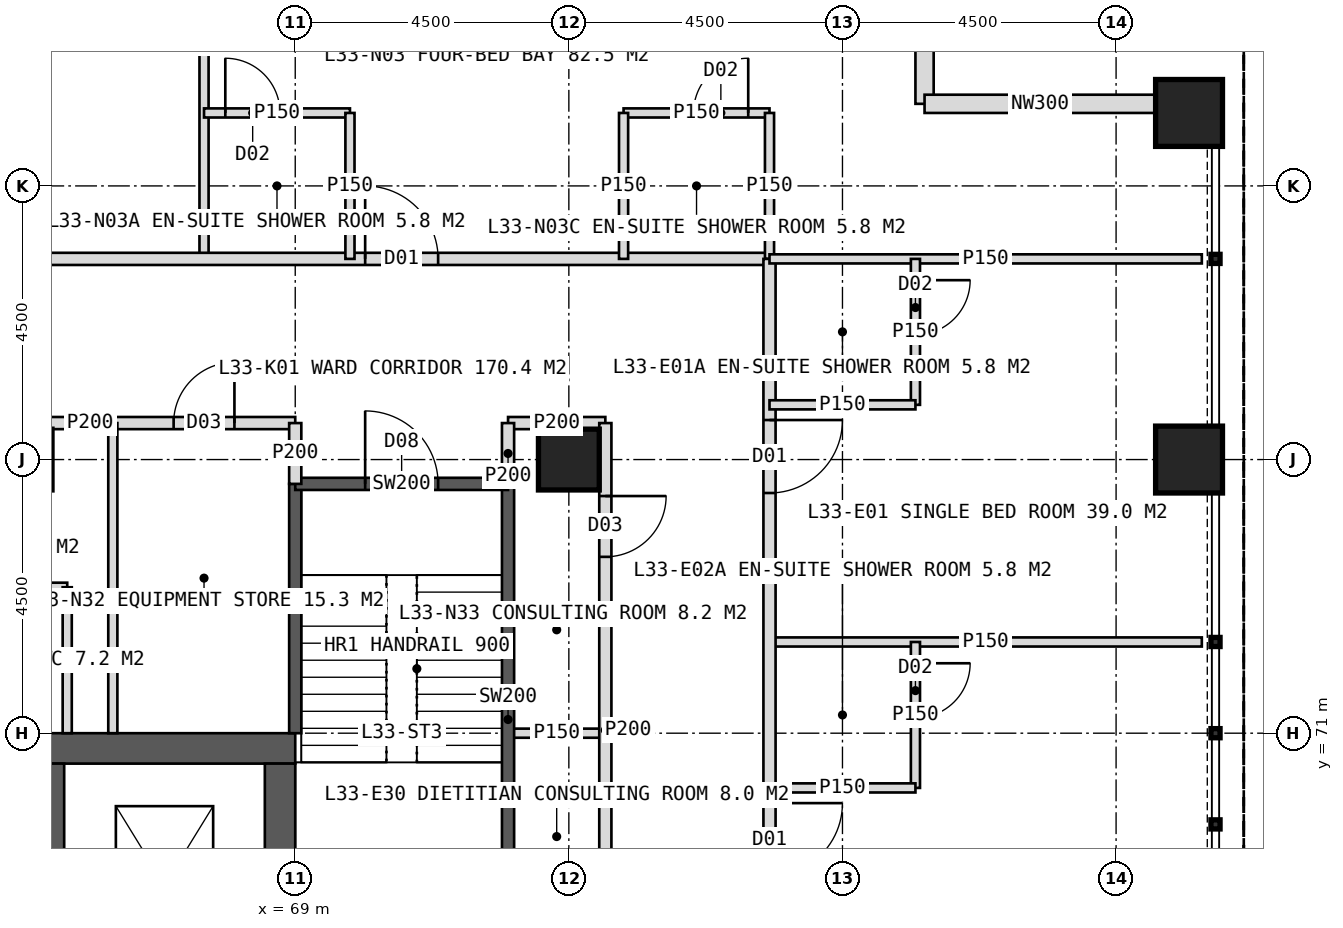
"""IFC4 building model, lengths in metres.
Left out: names, types, materials, properties, quantities, classifications, styles, units other than length and angle.
Written with IfcOpenShell. Run it as: python <this file> out.ifc"""

import sys

from ifc_helpers import new_model, si_unit, direction, frame, frame_2d, origin, origin_2d, place, context, subcontext, project, spatial, rectangle, hollow_rectangle, extrude, element, fill, save


model = new_model("IFC4")
c1 = context("Model", 3, precision=1e-05, world=origin(), true_north=direction((0.0, 1.0)))
c2 = subcontext(c1, "Body", "Model", "MODEL_VIEW")
j1 = project(units=[si_unit("LENGTHUNIT", "METRE"), si_unit("PLANEANGLEUNIT", "RADIAN")], contexts=[c1])
p1 = place(None, origin())
s1 = spatial("IfcSite", under=j1, at=p1, CompositionType="ELEMENT")
p2 = place(p1, origin())
s2 = spatial("IfcBuilding", under=s1, at=p2, CompositionType="ELEMENT")
p3 = place(p2, frame((0.0, 0.0, 140.0)))
s3 = spatial("IfcBuildingStorey", under=s2, at=p3, CompositionType="ELEMENT", Elevation=140.0)
p4 = place(p3, frame((51.0, 70.75, 0.0), z_axis=(0.0, 0.0, 1.0), x_axis=(1.0, 0.0, 0.0)))
e1 = element("IfcWall", 1, at=p4, inside=s3, PredefinedType="SHEAR", context=c2, shape_type="SweptSolid", body=[
    extrude(rectangle(XDim=18.0, YDim=0.5, at=frame_2d((9.0, 0.0))), origin(), (0.0, 0.0, 1.0), 4.0),
])
p5 = place(p4, frame((8.1, 0.0, 0.0)))
e2 = element("IfcOpeningElement", 2, at=p5, cuts=e1, PredefinedType="OPENING", context=c2, shape_type="SweptSolid", body=[
    extrude(rectangle(XDim=1.8, YDim=2.2, at=frame_2d((0.9, 1.1))), frame((0.0, 0.26, 0.0), z_axis=(0.0, -1.0, 0.0), x_axis=(1.0, 0.0, 0.0)), (0.0, 0.0, 1.0), 0.52),
])
p6 = place(p3, frame((68.75, 53.5, 0.0), z_axis=(0.0, 0.0, 1.0), x_axis=(0.0, 1.0, 0.0)))
e3 = element("IfcWall", 3, at=p6, inside=s3, PredefinedType="SHEAR", context=c2, shape_type="SweptSolid", body=[
    extrude(rectangle(XDim=17.0, YDim=0.5, at=frame_2d((8.5, 0.0))), origin(), (0.0, 0.0, 1.0), 4.0),
])
p7 = place(p6, frame((9.5, 0.0, 0.0)))
e4 = element("IfcOpeningElement", 4, at=p7, cuts=e3, PredefinedType="OPENING", context=c2, shape_type="SweptSolid", body=[
    extrude(rectangle(XDim=1.5, YDim=2.2, at=frame_2d((0.75, 1.1))), frame((0.0, 0.26, 0.0), z_axis=(0.0, -1.0, 0.0), x_axis=(1.0, 0.0, 0.0)), (0.0, 0.0, 1.0), 0.52),
])
p8 = place(p3, frame((65.05, 53.5, 0.0), z_axis=(0.0, 0.0, 1.0), x_axis=(0.0, 1.0, 0.0)))
e5 = element("IfcWall", 5, at=p8, inside=s3, PredefinedType="SHEAR", context=c2, shape_type="SweptSolid", body=[
    extrude(rectangle(XDim=17.0, YDim=0.3, at=frame_2d((8.5, 0.0))), origin(), (0.0, 0.0, 1.0), 4.0),
])
p9 = place(p3, frame((73.5, 75.5, 0.0), z_axis=(0.0, 0.0, 1.0), x_axis=(1.0, 0.0, 0.0)))
e6 = element("IfcColumn", 6, at=p9, inside=s3, PredefinedType="COLUMN", context=c2, shape_type="SweptSolid", body=[
    extrude(hollow_rectangle(XDim=1.0, YDim=1.0, WallThickness=0.1, at=origin_2d()), origin(), (0.0, 0.0, 1.0), 4.0),
])
for number, where, z_axis, x_axis in (
    (7, (83.7, 75.5, 0.0), (0.0, 0.0, 1.0), (1.0, 0.0, 0.0)),
    (8, (83.7, 81.2, 0.0), (0.0, 0.0, 1.0), (1.0, 0.0, 0.0)),
):
    element("IfcColumn", number, at=place(p3, frame(where, z_axis=z_axis, x_axis=x_axis)), inside=s3, PredefinedType="COLUMN", context=c2, shape_type="SweptSolid", body=[
        extrude(hollow_rectangle(XDim=1.1, YDim=1.1, WallThickness=0.1, at=origin_2d()), origin(), (0.0, 0.0, 1.0), 4.0),
    ])
for number, where, z_axis, x_axis in (
    (9, (79.35, 85.15, 0.0), (0.0, 0.0, 1.0), (0.0, -1.0, 0.0)),
    (10, (79.35, 81.35, 0.0), (0.0, 0.0, 1.0), (1.0, 0.0, 0.0)),
):
    element("IfcWall", number, at=place(p3, frame(where, z_axis=z_axis, x_axis=x_axis)), inside=s3, PredefinedType="ELEMENTEDWALL", context=c2, shape_type="SweptSolid", body=[
        extrude(rectangle(XDim=3.8, YDim=0.3, at=frame_2d((1.9, 0.0))), origin(), (0.0, 0.0, 1.0), 4.0),
    ])
p10 = place(p3, frame((67.5, 78.8, 0.0), z_axis=(0.0, 0.0, 1.0), x_axis=(0.0, 1.0, 0.0)))
e11 = element("IfcWall", 11, at=p10, inside=s3, PredefinedType="PARTITIONING", context=c2, shape_type="SweptSolid", body=[
    extrude(rectangle(XDim=7.11, YDim=0.15, at=frame_2d((3.555, 0.0))), origin(), (0.0, 0.0, 1.0), 3.75),
])
p11 = place(p3, frame((43.2, 78.8, 0.0), z_axis=(0.0, 0.0, 1.0), x_axis=(1.0, 0.0, 0.0)))
e12 = element("IfcWall", 12, at=p11, inside=s3, PredefinedType="PARTITIONING", context=c2, shape_type="SweptSolid", body=[
    extrude(rectangle(XDim=33.6, YDim=0.2, at=frame_2d((16.8, 0.0))), origin(), (0.0, 0.0, 1.0), 3.75),
])
p12 = place(p11, frame((3.25, 0.0, 0.0)))
e13 = element("IfcOpeningElement", 13, at=p12, cuts=e12, PredefinedType="OPENING", context=c2, shape_type="SweptSolid", body=[
    extrude(rectangle(XDim=1.2, YDim=2.2, at=frame_2d((0.6, 1.1))), frame((0.0, 0.11, 0.0), z_axis=(0.0, -1.0, 0.0), x_axis=(1.0, 0.0, 0.0)), (0.0, 0.0, 1.0), 0.22),
])
p13 = place(p11, frame((12.55, 0.0, 0.0)))
e14 = element("IfcOpeningElement", 14, at=p13, cuts=e12, PredefinedType="OPENING", context=c2, shape_type="SweptSolid", body=[
    extrude(rectangle(XDim=1.2, YDim=2.2, at=frame_2d((0.6, 1.1))), frame((0.0, 0.11, 0.0), z_axis=(0.0, -1.0, 0.0), x_axis=(1.0, 0.0, 0.0)), (0.0, 0.0, 1.0), 0.22),
])
p14 = place(p11, frame((26.95, 0.0, 0.0)))
e15 = element("IfcOpeningElement", 15, at=p14, cuts=e12, PredefinedType="OPENING", context=c2, shape_type="SweptSolid", body=[
    extrude(rectangle(XDim=1.2, YDim=2.2, at=frame_2d((0.6, 1.1))), frame((0.0, 0.11, 0.0), z_axis=(0.0, -1.0, 0.0), x_axis=(1.0, 0.0, 0.0)), (0.0, 0.0, 1.0), 0.22),
])
p15 = place(p3, frame((67.5, 81.2, 0.0), z_axis=(0.0, 0.0, 1.0), x_axis=(1.0, 0.0, 0.0)))
e16 = element("IfcWall", 16, at=p15, inside=s3, PredefinedType="PARTITIONING", context=c2, shape_type="SweptSolid", body=[
    extrude(rectangle(XDim=2.4, YDim=0.15, at=frame_2d((1.2, 0.0))), origin(), (0.0, 0.0, 1.0), 3.75),
])
p16 = place(p15, frame((0.35, 0.0, 0.0)))
e17 = element("IfcOpeningElement", 17, at=p16, cuts=e16, PredefinedType="OPENING", context=c2, shape_type="SweptSolid", body=[
    extrude(rectangle(XDim=0.9, YDim=2.1, at=frame_2d((0.45, 1.05))), frame((0.0, 0.085, 0.0), z_axis=(0.0, -1.0, 0.0), x_axis=(1.0, 0.0, 0.0)), (0.0, 0.0, 1.0), 0.17),
])
p17 = place(p3, frame((69.9, 78.8, 0.0), z_axis=(0.0, 0.0, 1.0), x_axis=(0.0, 1.0, 0.0)))
e18 = element("IfcWall", 18, at=p17, inside=s3, PredefinedType="PARTITIONING", context=c2, shape_type="SweptSolid", body=[
    extrude(rectangle(XDim=2.4, YDim=0.15, at=frame_2d((1.2, 0.0))), origin(), (0.0, 0.0, 1.0), 3.75),
])
p18 = place(p3, frame((74.4, 81.2, 0.0), z_axis=(0.0, 0.0, 1.0), x_axis=(1.0, 0.0, 0.0)))
e19 = element("IfcWall", 19, at=p18, inside=s3, PredefinedType="PARTITIONING", context=c2, shape_type="SweptSolid", body=[
    extrude(rectangle(XDim=2.4, YDim=0.15, at=frame_2d((1.2, 0.0))), origin(), (0.0, 0.0, 1.0), 2.997),
])
p19 = place(p18, frame((1.15, 0.0, 0.0)))
e20 = element("IfcOpeningElement", 20, at=p19, cuts=e19, PredefinedType="OPENING", context=c2, shape_type="SweptSolid", body=[
    extrude(rectangle(XDim=0.9, YDim=2.1, at=frame_2d((0.45, 1.05))), frame((0.0, 0.085, 0.0), z_axis=(0.0, -1.0, 0.0), x_axis=(1.0, 0.0, 0.0)), (0.0, 0.0, 1.0), 0.17),
])
for number, where, z_axis, x_axis in (
    (21, (74.4, 78.8, 0.0), (0.0, 0.0, 1.0), (0.0, 1.0, 0.0)),
    (22, (76.8, 78.8, 0.0), (0.0, 0.0, 1.0), (0.0, 1.0, 0.0)),
):
    element("IfcWall", number, at=place(p3, frame(where, z_axis=z_axis, x_axis=x_axis)), inside=s3, PredefinedType="PARTITIONING", context=c2, shape_type="SweptSolid", body=[
        extrude(rectangle(XDim=2.4, YDim=0.15, at=frame_2d((1.2, 0.0))), origin(), (0.0, 0.0, 1.0), 3.75),
    ])
p20 = place(p3, frame((62.25, 76.1, 0.0), z_axis=(0.0, 0.0, 1.0), x_axis=(1.0, 0.0, 0.0)))
e23 = element("IfcWall", 23, at=p20, inside=s3, PredefinedType="PARTITIONING", context=c2, shape_type="SweptSolid", body=[
    extrude(rectangle(XDim=6.75, YDim=0.2, at=frame_2d((3.375, 0.0))), origin(), (0.0, 0.0, 1.0), 3.75),
])
p21 = place(p20, frame((0.325, 0.0, 0.0)))
e24 = element("IfcOpeningElement", 24, at=p21, cuts=e23, PredefinedType="OPENING", context=c2, shape_type="SweptSolid", body=[
    extrude(rectangle(XDim=1.0, YDim=2.1, at=frame_2d((0.5, 1.05))), frame((0.0, 0.11, 0.0), z_axis=(0.0, -1.0, 0.0), x_axis=(1.0, 0.0, 0.0)), (0.0, 0.0, 1.0), 0.22),
])
p22 = place(p20, frame((4.75, 0.0, 0.0)))
e25 = element("IfcOpeningElement", 25, at=p22, cuts=e23, PredefinedType="OPENING", context=c2, shape_type="SweptSolid", body=[
    extrude(rectangle(XDim=1.0, YDim=2.1, at=frame_2d((0.5, 1.05))), frame((0.0, 0.11, 0.0), z_axis=(0.0, -1.0, 0.0), x_axis=(1.0, 0.0, 0.0)), (0.0, 0.0, 1.0), 0.22),
])
p23 = place(p3, frame((72.5, 76.1, 0.0), z_axis=(0.0, 0.0, 1.0), x_axis=(1.0, 0.0, 0.0)))
e26 = element("IfcWall", 26, at=p23, inside=s3, PredefinedType="PARTITIONING", context=c2, shape_type="SweptSolid", body=[
    extrude(rectangle(XDim=1.6, YDim=0.2, at=frame_2d((0.8, 0.0))), origin(), (0.0, 0.0, 1.0), 3.75),
])
p24 = place(p3, frame((66.0, 71.0, 0.0), z_axis=(0.0, 0.0, 1.0), x_axis=(0.0, 1.0, 0.0)))
e27 = element("IfcWall", 27, at=p24, inside=s3, PredefinedType="PARTITIONING", context=c2, shape_type="SweptSolid", body=[
    extrude(rectangle(XDim=5.1, YDim=0.15, at=frame_2d((2.55, 0.0))), origin(), (0.0, 0.0, 1.0), 3.75),
])
p25 = place(p3, frame((62.25, 73.4, 0.0), z_axis=(0.0, 0.0, 1.0), x_axis=(1.0, 0.0, 0.0)))
e28 = element("IfcWall", 28, at=p25, inside=s3, PredefinedType="PARTITIONING", context=c2, shape_type="SweptSolid", body=[
    extrude(rectangle(XDim=3.0, YDim=0.15, at=frame_2d((1.5, 0.0))), origin(), (0.0, 0.0, 1.0), 3.75),
])
p26 = place(p3, frame((65.25, 71.0, 0.0), z_axis=(0.0, 0.0, 1.0), x_axis=(0.0, 1.0, 0.0)))
e29 = element("IfcWall", 29, at=p26, inside=s3, PredefinedType="PARTITIONING", context=c2, shape_type="SweptSolid", body=[
    extrude(rectangle(XDim=2.4, YDim=0.15, at=frame_2d((1.2, 0.0))), origin(), (0.0, 0.0, 1.0), 3.75),
])
p27 = place(p3, frame((76.8, 72.5, 0.0), z_axis=(0.0, 0.0, 1.0), x_axis=(1.0, 0.0, 0.0)))
e30 = element("IfcWall", 30, at=p27, inside=s3, PredefinedType="PARTITIONING", context=c2, shape_type="SweptSolid", body=[
    extrude(rectangle(XDim=7.11, YDim=0.15, at=frame_2d((3.555, 0.0))), origin(), (0.0, 0.0, 1.0), 3.75),
])
p28 = place(p3, frame((76.8, 78.8, 0.0), z_axis=(0.0, 0.0, 1.0), x_axis=(0.0, -1.0, 0.0)))
e31 = element("IfcWall", 31, at=p28, inside=s3, PredefinedType="PARTITIONING", context=c2, shape_type="SweptSolid", body=[
    extrude(rectangle(XDim=33.6, YDim=0.2, at=frame_2d((16.8, 0.0))), origin(), (0.0, 0.0, 1.0), 3.75),
])
p29 = place(p28, frame((2.65, 0.0, 0.0)))
e32 = element("IfcOpeningElement", 32, at=p29, cuts=e31, PredefinedType="OPENING", context=c2, shape_type="SweptSolid", body=[
    extrude(rectangle(XDim=1.2, YDim=2.2, at=frame_2d((0.6, 1.1))), frame((0.0, 0.11, 0.0), z_axis=(0.0, -1.0, 0.0), x_axis=(1.0, 0.0, 0.0)), (0.0, 0.0, 1.0), 0.22),
])
p30 = place(p28, frame((8.95, 0.0, 0.0)))
e33 = element("IfcOpeningElement", 33, at=p30, cuts=e31, PredefinedType="OPENING", context=c2, shape_type="SweptSolid", body=[
    extrude(rectangle(XDim=1.2, YDim=2.2, at=frame_2d((0.6, 1.1))), frame((0.0, 0.11, 0.0), z_axis=(0.0, -1.0, 0.0), x_axis=(1.0, 0.0, 0.0)), (0.0, 0.0, 1.0), 0.22),
])
p31 = place(p28, frame((19.45, 0.0, 0.0)))
e34 = element("IfcOpeningElement", 34, at=p31, cuts=e31, PredefinedType="OPENING", context=c2, shape_type="SweptSolid", body=[
    extrude(rectangle(XDim=1.2, YDim=2.2, at=frame_2d((0.6, 1.1))), frame((0.0, 0.11, 0.0), z_axis=(0.0, -1.0, 0.0), x_axis=(1.0, 0.0, 0.0)), (0.0, 0.0, 1.0), 0.22),
])
p32 = place(p28, frame((28.45, 0.0, 0.0)))
e35 = element("IfcOpeningElement", 35, at=p32, cuts=e31, PredefinedType="OPENING", context=c2, shape_type="SweptSolid", body=[
    extrude(rectangle(XDim=1.2, YDim=2.2, at=frame_2d((0.6, 1.1))), frame((0.0, 0.11, 0.0), z_axis=(0.0, -1.0, 0.0), x_axis=(1.0, 0.0, 0.0)), (0.0, 0.0, 1.0), 0.22),
])
p33 = place(p3, frame((76.8, 78.8, 0.0), z_axis=(0.0, 0.0, 1.0), x_axis=(1.0, 0.0, 0.0)))
e36 = element("IfcWall", 36, at=p33, inside=s3, PredefinedType="PARTITIONING", context=c2, shape_type="SweptSolid", body=[
    extrude(rectangle(XDim=7.11, YDim=0.15, at=frame_2d((3.555, 0.0))), origin(), (0.0, 0.0, 1.0), 3.75),
])
p34 = place(p3, frame((79.2, 78.8, 0.0), z_axis=(0.0, 0.0, 1.0), x_axis=(0.0, -1.0, 0.0)))
e37 = element("IfcWall", 37, at=p34, inside=s3, PredefinedType="PARTITIONING", context=c2, shape_type="SweptSolid", body=[
    extrude(rectangle(XDim=2.4, YDim=0.15, at=frame_2d((1.2, 0.0))), origin(), (0.0, 0.0, 1.0), 2.997),
])
p35 = place(p34, frame((0.35, 0.0, 0.0)))
e38 = element("IfcOpeningElement", 38, at=p35, cuts=e37, PredefinedType="OPENING", context=c2, shape_type="SweptSolid", body=[
    extrude(rectangle(XDim=0.9, YDim=2.1, at=frame_2d((0.45, 1.05))), frame((0.0, 0.085, 0.0), z_axis=(0.0, -1.0, 0.0), x_axis=(1.0, 0.0, 0.0)), (0.0, 0.0, 1.0), 0.17),
])
p36 = place(p3, frame((76.8, 76.4, 0.0), z_axis=(0.0, 0.0, 1.0), x_axis=(1.0, 0.0, 0.0)))
e39 = element("IfcWall", 39, at=p36, inside=s3, PredefinedType="PARTITIONING", context=c2, shape_type="SweptSolid", body=[
    extrude(rectangle(XDim=2.4, YDim=0.15, at=frame_2d((1.2, 0.0))), origin(), (0.0, 0.0, 1.0), 3.75),
])
p37 = place(p3, frame((79.2, 72.5, 0.0), z_axis=(0.0, 0.0, 1.0), x_axis=(0.0, -1.0, 0.0)))
e40 = element("IfcWall", 40, at=p37, inside=s3, PredefinedType="PARTITIONING", context=c2, shape_type="SweptSolid", body=[
    extrude(rectangle(XDim=2.4, YDim=0.15, at=frame_2d((1.2, 0.0))), origin(), (0.0, 0.0, 1.0), 3.75),
])
p38 = place(p37, frame((0.35, 0.0, 0.0)))
e41 = element("IfcOpeningElement", 41, at=p38, cuts=e40, PredefinedType="OPENING", context=c2, shape_type="SweptSolid", body=[
    extrude(rectangle(XDim=0.9, YDim=2.1, at=frame_2d((0.45, 1.05))), frame((0.0, 0.085, 0.0), z_axis=(0.0, -1.0, 0.0), x_axis=(1.0, 0.0, 0.0)), (0.0, 0.0, 1.0), 0.17),
])
p39 = place(p3, frame((76.8, 70.1, 0.0), z_axis=(0.0, 0.0, 1.0), x_axis=(1.0, 0.0, 0.0)))
e42 = element("IfcWall", 42, at=p39, inside=s3, PredefinedType="PARTITIONING", context=c2, shape_type="SweptSolid", body=[
    extrude(rectangle(XDim=2.4, YDim=0.15, at=frame_2d((1.2, 0.0))), origin(), (0.0, 0.0, 1.0), 3.75),
])
p40 = place(p3, frame((72.5, 71.0, 0.0), z_axis=(0.0, 0.0, 1.0), x_axis=(1.0, 0.0, 0.0)))
e43 = element("IfcWall", 43, at=p40, inside=s3, PredefinedType="PARTITIONING", context=c2, shape_type="SweptSolid", body=[
    extrude(rectangle(XDim=1.6, YDim=0.15, at=frame_2d((0.8, 0.0))), origin(), (0.0, 0.0, 1.0), 3.75),
])
p41 = place(p3, frame((74.1, 76.1, 0.0), z_axis=(0.0, 0.0, 1.0), x_axis=(0.0, -1.0, 0.0)))
e44 = element("IfcWall", 44, at=p41, inside=s3, PredefinedType="PARTITIONING", context=c2, shape_type="SweptSolid", body=[
    extrude(rectangle(XDim=10.1, YDim=0.2, at=frame_2d((5.05, 0.0))), origin(), (0.0, 0.0, 1.0), 3.75),
])
p42 = place(p41, frame((1.2, 0.0, 0.0)))
e45 = element("IfcOpeningElement", 45, at=p42, cuts=e44, PredefinedType="OPENING", context=c2, shape_type="SweptSolid", body=[
    extrude(rectangle(XDim=1.0, YDim=2.1, at=frame_2d((0.5, 1.05))), frame((0.0, 0.11, 0.0), z_axis=(0.0, -1.0, 0.0), x_axis=(1.0, 0.0, 0.0)), (0.0, 0.0, 1.0), 0.22),
])
p43 = place(p41, frame((7.1, 0.0, 0.0)))
e46 = element("IfcOpeningElement", 46, at=p43, cuts=e44, PredefinedType="OPENING", context=c2, shape_type="SweptSolid", body=[
    extrude(rectangle(XDim=1.0, YDim=2.1, at=frame_2d((0.5, 1.05))), frame((0.0, 0.11, 0.0), z_axis=(0.0, -1.0, 0.0), x_axis=(1.0, 0.0, 0.0)), (0.0, 0.0, 1.0), 0.22),
])
p44 = place(p3, frame((69.0, 71.0, 0.0), z_axis=(0.0, 0.0, 1.0), x_axis=(0.0, 1.0, 0.0)))
e47 = element("IfcWall", 47, at=p44, inside=s3, PredefinedType="SOLIDWALL", context=c2, shape_type="SweptSolid", body=[
    extrude(rectangle(XDim=4.1, YDim=0.2, at=frame_2d((2.05, 0.0))), origin(), (0.0, 0.0, 1.0), 3.75),
])
p45 = place(p3, frame((72.5, 67.35, 0.0), z_axis=(0.0, 0.0, 1.0), x_axis=(0.0, 1.0, 0.0)))
e48 = element("IfcWall", 48, at=p45, inside=s3, PredefinedType="SOLIDWALL", context=c2, shape_type="SweptSolid", body=[
    extrude(rectangle(XDim=7.75, YDim=0.2, at=frame_2d((3.875, 0.0))), origin(), (0.0, 0.0, 1.0), 3.75),
])
p46 = place(p3, frame((69.0, 75.1, 0.0), z_axis=(0.0, 0.0, 1.0), x_axis=(1.0, 0.0, 0.0)))
e49 = element("IfcWall", 49, at=p46, inside=s3, PredefinedType="SOLIDWALL", context=c2, shape_type="SweptSolid", body=[
    extrude(rectangle(XDim=3.5, YDim=0.2, at=frame_2d((1.75, 0.0))), origin(), (0.0, 0.0, 1.0), 3.75),
])
p47 = place(p46, frame((1.15, 0.0, 0.0)))
e50 = element("IfcOpeningElement", 50, at=p47, cuts=e49, PredefinedType="OPENING", context=c2, shape_type="SweptSolid", body=[
    extrude(rectangle(XDim=1.2, YDim=2.1, at=frame_2d((0.6, 1.05))), frame((0.0, 0.11, 0.0), z_axis=(0.0, -1.0, 0.0), x_axis=(1.0, 0.0, 0.0)), (0.0, 0.0, 1.0), 0.22),
])
for number, where, z_axis, x_axis in (
    (51, (69.0, 75.1, 0.0), (0.0, 0.0, 1.0), (0.0, 1.0, 0.0)),
    (52, (72.5, 75.1, 0.0), (0.0, 0.0, 1.0), (0.0, 1.0, 0.0)),
):
    element("IfcWall", number, at=place(p3, frame(where, z_axis=z_axis, x_axis=x_axis)), inside=s3, PredefinedType="PARTITIONING", context=c2, shape_type="SweptSolid", body=[
        extrude(rectangle(XDim=1.0, YDim=0.2, at=frame_2d((0.5, 0.0))), origin(), (0.0, 0.0, 1.0), 3.75),
    ])
p48 = place(p14, origin())
e53 = element("IfcDoor", 53, at=p48, inside=s3, OperationType="SINGLE_SWING_LEFT", PredefinedType="DOOR", context=c2, shape_type="SweptSolid", body=[
    extrude(rectangle(XDim=1.2, YDim=2.2, at=frame_2d((0.6, 1.1))), frame((0.0, 0.025, 0.0), z_axis=(0.0, -1.0, 0.0), x_axis=(1.0, 0.0, 0.0)), (0.0, 0.0, 1.0), 0.05),
])
fill(e15, e53)
p49 = place(p16, origin())
e54 = element("IfcDoor", 54, at=p49, inside=s3, OperationType="SINGLE_SWING_LEFT", PredefinedType="DOOR", context=c2, shape_type="SweptSolid", body=[
    extrude(rectangle(XDim=0.9, YDim=2.1, at=frame_2d((0.45, 1.05))), frame((0.0, 0.025, 0.0), z_axis=(0.0, -1.0, 0.0), x_axis=(1.0, 0.0, 0.0)), (0.0, 0.0, 1.0), 0.05),
])
fill(e17, e54)
p50 = place(p19, origin())
e55 = element("IfcDoor", 55, at=p50, inside=s3, OperationType="SINGLE_SWING_RIGHT", PredefinedType="DOOR", context=c2, shape_type="SweptSolid", body=[
    extrude(rectangle(XDim=0.9, YDim=2.1, at=frame_2d((0.45, 1.05))), frame((0.0, 0.025, 0.0), z_axis=(0.0, -1.0, 0.0), x_axis=(1.0, 0.0, 0.0)), (0.0, 0.0, 1.0), 0.05),
])
fill(e20, e55)
p51 = place(p22, origin())
e56 = element("IfcDoor", 56, at=p51, inside=s3, OperationType="SINGLE_SWING_RIGHT", PredefinedType="DOOR", context=c2, shape_type="SweptSolid", body=[
    extrude(rectangle(XDim=1.0, YDim=2.1, at=frame_2d((0.5, 1.05))), frame((0.0, 0.025, 0.0), z_axis=(0.0, -1.0, 0.0), x_axis=(1.0, 0.0, 0.0)), (0.0, 0.0, 1.0), 0.05),
])
fill(e25, e56)
p52 = place(p42, origin())
e57 = element("IfcDoor", 57, at=p52, inside=s3, OperationType="SINGLE_SWING_LEFT", PredefinedType="DOOR", context=c2, shape_type="SweptSolid", body=[
    extrude(rectangle(XDim=1.0, YDim=2.1, at=frame_2d((0.5, 1.05))), frame((0.0, 0.025, 0.0), z_axis=(0.0, -1.0, 0.0), x_axis=(1.0, 0.0, 0.0)), (0.0, 0.0, 1.0), 0.05),
])
fill(e45, e57)
p53 = place(p29, origin())
e58 = element("IfcDoor", 58, at=p53, inside=s3, OperationType="SINGLE_SWING_LEFT", PredefinedType="DOOR", context=c2, shape_type="SweptSolid", body=[
    extrude(rectangle(XDim=1.2, YDim=2.2, at=frame_2d((0.6, 1.1))), frame((0.0, 0.025, 0.0), z_axis=(0.0, -1.0, 0.0), x_axis=(1.0, 0.0, 0.0)), (0.0, 0.0, 1.0), 0.05),
])
fill(e32, e58)
p54 = place(p35, origin())
e59 = element("IfcDoor", 59, at=p54, inside=s3, OperationType="SINGLE_SWING_LEFT", PredefinedType="DOOR", context=c2, shape_type="SweptSolid", body=[
    extrude(rectangle(XDim=0.9, YDim=2.1, at=frame_2d((0.45, 1.05))), frame((0.0, 0.025, 0.0), z_axis=(0.0, -1.0, 0.0), x_axis=(1.0, 0.0, 0.0)), (0.0, 0.0, 1.0), 0.05),
])
fill(e38, e59)
p55 = place(p30, origin())
e60 = element("IfcDoor", 60, at=p55, inside=s3, OperationType="SINGLE_SWING_LEFT", PredefinedType="DOOR", context=c2, shape_type="SweptSolid", body=[
    extrude(rectangle(XDim=1.2, YDim=2.2, at=frame_2d((0.6, 1.1))), frame((0.0, 0.025, 0.0), z_axis=(0.0, -1.0, 0.0), x_axis=(1.0, 0.0, 0.0)), (0.0, 0.0, 1.0), 0.05),
])
fill(e33, e60)
p56 = place(p38, origin())
e61 = element("IfcDoor", 61, at=p56, inside=s3, OperationType="SINGLE_SWING_LEFT", PredefinedType="DOOR", context=c2, shape_type="SweptSolid", body=[
    extrude(rectangle(XDim=0.9, YDim=2.1, at=frame_2d((0.45, 1.05))), frame((0.0, 0.025, 0.0), z_axis=(0.0, -1.0, 0.0), x_axis=(1.0, 0.0, 0.0)), (0.0, 0.0, 1.0), 0.05),
])
fill(e41, e61)
p57 = place(p47, origin())
e62 = element("IfcDoor", 62, at=p57, inside=s3, OperationType="SINGLE_SWING_LEFT", PredefinedType="DOOR", context=c2, shape_type="SweptSolid", body=[
    extrude(rectangle(XDim=1.2, YDim=2.1, at=frame_2d((0.6, 1.05))), frame((0.0, 0.025, 0.0), z_axis=(0.0, -1.0, 0.0), x_axis=(1.0, 0.0, 0.0)), (0.0, 0.0, 1.0), 0.05),
])
fill(e50, e62)
save(model, sys.argv[1])
